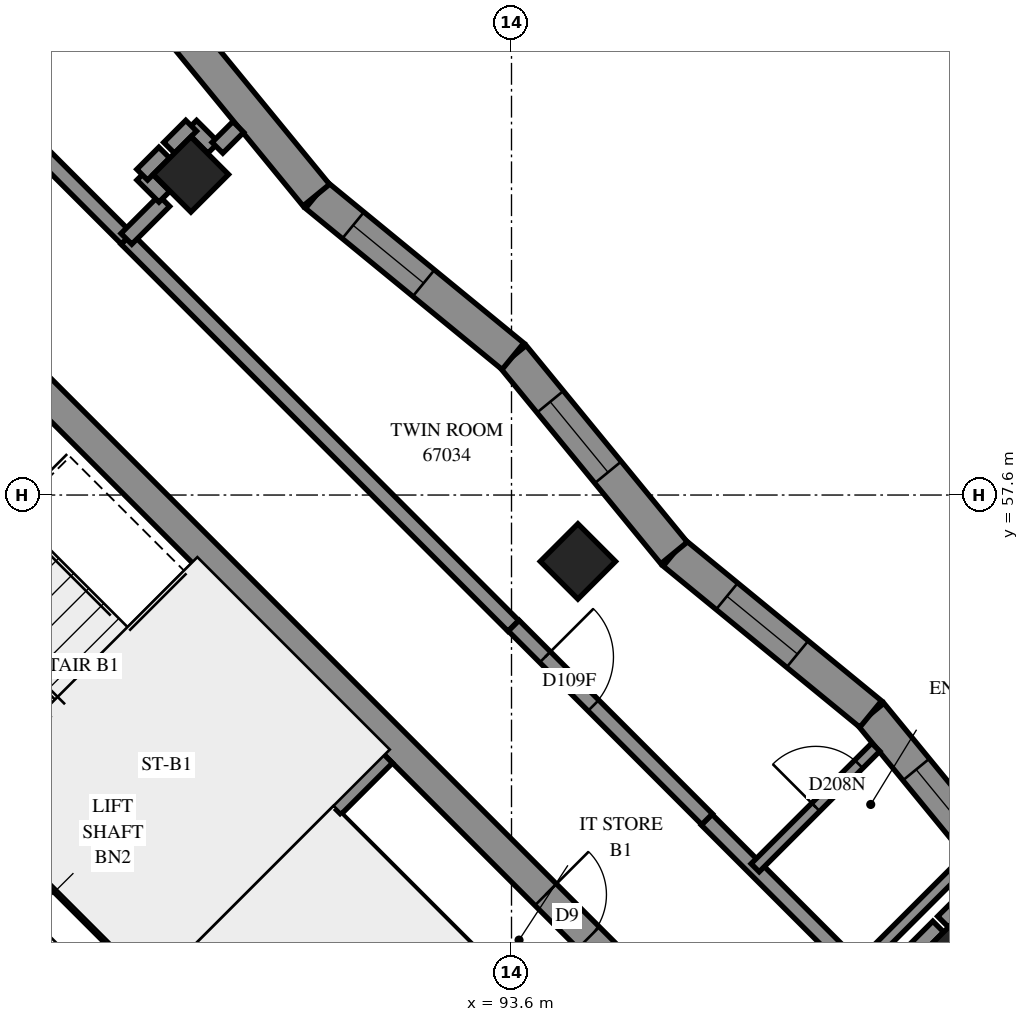
"""IFC4 building model, lengths in metres.
Left out: names, types, materials, properties, quantities, classifications, styles, units other than length and angle.
Written with IfcOpenShell. Run it as: python <this file> out.ifc"""

import sys

from ifc_helpers import new_model, si_unit, direction, frame, frame_2d, origin, origin_2d, place, context, subcontext, project, spatial, polyline, rectangle, outline, extrude, element, fill, save


model = new_model("IFC4")
c1 = context("Model", 3, precision=1e-05, world=origin(), true_north=direction((0.0, 1.0)))
c2 = subcontext(c1, "Body", "Model", "MODEL_VIEW")
j1 = project(units=[si_unit("LENGTHUNIT", "METRE"), si_unit("PLANEANGLEUNIT", "RADIAN")], contexts=[c1])
p1 = place(None, origin())
s1 = spatial("IfcSite", under=j1, at=p1, CompositionType="ELEMENT")
p2 = place(p1, origin())
s2 = spatial("IfcBuilding", under=s1, at=p2, CompositionType="ELEMENT")
p3 = place(p2, frame((0.0, 0.0, 247.2)))
s3 = spatial("IfcBuildingStorey", under=s2, at=p3, CompositionType="ELEMENT", Elevation=247.2)
for number, where, z_axis, x_axis in (
    (1, (89.382, 61.818, 0.0), (0.0, 0.0, 1.0), (0.707, -0.707, 0.0)),
    (2, (94.474, 56.727, 0.0), (0.0, 0.0, 1.0), (0.707, -0.707, 0.0)),
    (3, (99.565, 51.635, 0.0), (0.0, 0.0, 1.0), (0.707, -0.707, 0.0)),
):
    element("IfcColumn", number, at=place(p3, frame(where, z_axis=z_axis, x_axis=x_axis)), inside=s3, PredefinedType="COLUMN", context=c2, shape_type="SweptSolid", body=[
        extrude(rectangle(XDim=0.7, YDim=0.7, at=origin_2d()), origin(), (0.0, 0.0, 1.0), 3.1),
    ])
p4 = place(p3, frame((86.695, 59.696, -0.3), z_axis=(0.0, 0.0, 1.0), x_axis=(0.7071100706, -0.7071034917, 0.0)))
e4 = element("IfcWall", 4, at=p4, inside=s3, PredefinedType="SHEAR", context=c2, shape_type="SweptSolid", body=[
    extrude(rectangle(XDim=15.2, YDim=0.4, at=frame_2d((7.6, 0.0))), origin(), (0.0, 0.0, 1.0), 2.7),
])
p5 = place(p4, frame((10.4, 0.0, 0.3)))
e5 = element("IfcOpeningElement", 5, at=p5, cuts=e4, PredefinedType="OPENING", context=c2, shape_type="SweptSolid", body=[
    extrude(rectangle(XDim=0.8, YDim=2.1, at=frame_2d((0.4, 1.05))), frame((0.0, 0.21, 0.0), z_axis=(0.0, -1.0, 0.0), x_axis=(1.0, 0.0, 0.0)), (0.0, 0.0, 1.0), 0.42),
])
p6 = place(p3, frame((81.534, 53.969, 0.0), z_axis=(0.0, 0.0, 1.0), x_axis=(0.707103309, -0.7071102534, 0.0)))
e6 = element("IfcWall", 6, at=p6, inside=s3, PredefinedType="SOLIDWALL", context=c2, shape_type="SweptSolid", body=[
    extrude(rectangle(XDim=14.4, YDim=0.3, at=frame_2d((7.2, 0.0))), origin(), (0.0, 0.0, 1.0), 3.1),
])
p7 = place(p6, frame((8.55, 0.0, 0.0)))
e7 = element("IfcOpeningElement", 7, at=p7, cuts=e6, PredefinedType="OPENING", context=c2, shape_type="SweptSolid", body=[
    extrude(rectangle(XDim=0.9, YDim=2.1, at=frame_2d((0.45, 1.05))), frame((0.0, 0.16, 0.0), z_axis=(0.0, -1.0, 0.0), x_axis=(1.0, 0.0, 0.0)), (0.0, 0.0, 1.0), 0.32),
])
p8 = place(p6, frame((1.25, 0.0, 0.0)))
e8 = element("IfcOpeningElement", 8, at=p8, cuts=e6, PredefinedType="OPENING", context=c2, shape_type="SweptSolid", body=[
    extrude(rectangle(XDim=1.1, YDim=2.1, at=frame_2d((0.55, 1.05))), frame((0.0, 0.16, 0.0), z_axis=(0.0, -1.0, 0.0), x_axis=(1.0, 0.0, 0.0)), (0.0, 0.0, 1.0), 0.32),
])
p9 = place(p6, frame((4.85, 0.0, 0.0)))
e9 = element("IfcOpeningElement", 9, at=p9, cuts=e6, PredefinedType="OPENING", context=c2, shape_type="SweptSolid", body=[
    extrude(rectangle(XDim=1.1, YDim=2.1, at=frame_2d((0.55, 1.05))), frame((0.0, 0.16, 0.0), z_axis=(0.0, -1.0, 0.0), x_axis=(1.0, 0.0, 0.0)), (0.0, 0.0, 1.0), 0.32),
])
p10 = place(p6, frame((12.05, 0.0, 0.0)))
e10 = element("IfcOpeningElement", 10, at=p10, cuts=e6, PredefinedType="OPENING", context=c2, shape_type="SweptSolid", body=[
    extrude(rectangle(XDim=1.1, YDim=2.1, at=frame_2d((0.55, 1.05))), frame((0.0, 0.16, 0.0), z_axis=(0.0, -1.0, 0.0), x_axis=(1.0, 0.0, 0.0)), (0.0, 0.0, 1.0), 0.32),
])
p11 = place(p3, frame((83.867, 56.302, 0.0), z_axis=(0.0, 0.0, 1.0), x_axis=(0.7071137256, -0.7070998367, 0.0)))
e11 = element("IfcWall", 11, at=p11, inside=s3, PredefinedType="SOLIDWALL", context=c2, shape_type="SweptSolid", body=[
    extrude(rectangle(XDim=7.2, YDim=0.3, at=frame_2d((3.6, 0.0))), origin(), (0.0, 0.0, 1.0), 3.1),
])
p12 = place(p3, frame((88.958, 51.211, 0.0), z_axis=(0.0, 0.0, 1.0), x_axis=(0.7071067812, 0.7071067812, 0.0)))
e12 = element("IfcWall", 12, at=p12, inside=s3, PredefinedType="SOLIDWALL", context=c2, shape_type="SweptSolid", body=[
    extrude(rectangle(XDim=4.2, YDim=0.3, at=frame_2d((2.1, 0.0))), origin(), (0.0, 0.0, 1.0), 3.1),
])
p13 = place(p3, frame((100.458, 52.116, 0.0), z_axis=(0.0, 0.0, 1.0), x_axis=(-0.6339011425, 0.7734140815, 0.0)))
e13 = element("IfcWall", 13, at=p13, inside=s3, PredefinedType="SOLIDWALL", context=c2, shape_type="SweptSolid", body=[
    extrude(outline(polyline([(0.042, -0.225), (3.387, -0.225), (3.342, 0.225), (-0.042, 0.225), (0.042, -0.225)])), origin(), (0.0, 0.0, 1.0), 3.1),
])
p14 = place(p13, frame((1.221, 0.0, 0.45)))
e14 = element("IfcOpeningElement", 14, at=p14, cuts=e13, PredefinedType="OPENING", context=c2, shape_type="SweptSolid", body=[
    extrude(rectangle(XDim=1.2, YDim=2.55, at=frame_2d((0.6, 1.275))), frame((0.0, 0.235, 0.0), z_axis=(0.0, -1.0, 0.0), x_axis=(1.0, 0.0, 0.0)), (0.0, 0.0, 1.0), 0.47),
])
p15 = place(p3, frame((98.325, 54.719, 0.0), z_axis=(0.0, 0.0, 1.0), x_axis=(-0.7734281512, 0.6338839759, 0.0)))
e15 = element("IfcWall", 15, at=p15, inside=s3, PredefinedType="SOLIDWALL", context=c2, shape_type="SweptSolid", body=[
    extrude(outline(polyline([(-0.022, -0.225), (3.322, -0.225), (3.367, 0.225), (0.022, 0.225), (-0.022, -0.225)])), origin(), (0.0, 0.0, 1.0), 3.1),
])
p16 = place(p15, frame((1.245, 0.0, 0.45)))
e16 = element("IfcOpeningElement", 16, at=p16, cuts=e15, PredefinedType="OPENING", context=c2, shape_type="SweptSolid", body=[
    extrude(rectangle(XDim=1.2, YDim=2.55, at=frame_2d((0.6, 1.275))), frame((0.0, 0.235, 0.0), z_axis=(0.0, -1.0, 0.0), x_axis=(1.0, 0.0, 0.0)), (0.0, 0.0, 1.0), 0.47),
])
p17 = place(p3, frame((95.739, 56.839, 0.0), z_axis=(0.0, 0.0, 1.0), x_axis=(-0.6338872028, 0.7734255065, 0.0)))
e17 = element("IfcWall", 17, at=p17, inside=s3, PredefinedType="SOLIDWALL", context=c2, shape_type="SweptSolid", body=[
    extrude(outline(polyline([(0.022, -0.225), (3.367, -0.225), (3.322, 0.225), (-0.022, 0.225), (0.022, -0.225)])), origin(), (0.0, 0.0, 1.0), 3.1),
])
p18 = place(p17, frame((1.371, 0.0, 0.45)))
e18 = element("IfcOpeningElement", 18, at=p18, cuts=e17, PredefinedType="OPENING", context=c2, shape_type="SweptSolid", body=[
    extrude(rectangle(XDim=1.2, YDim=2.55, at=frame_2d((0.6, 1.275))), frame((0.0, 0.235, 0.0), z_axis=(0.0, -1.0, 0.0), x_axis=(1.0, 0.0, 0.0)), (0.0, 0.0, 1.0), 0.47),
])
p19 = place(p3, frame((93.619, 59.425, 0.0), z_axis=(0.0, 0.0, 1.0), x_axis=(-0.7734134923, 0.6339018614, 0.0)))
e19 = element("IfcWall", 19, at=p19, inside=s3, PredefinedType="SOLIDWALL", context=c2, shape_type="SweptSolid", body=[
    extrude(outline(polyline([(-0.022, -0.225), (3.322, -0.225), (3.367, 0.225), (0.022, 0.225), (-0.022, -0.225)])), origin(), (0.0, 0.0, 1.0), 3.1),
])
p20 = place(p19, frame((1.518, 0.0, 0.45)))
e20 = element("IfcOpeningElement", 20, at=p20, cuts=e19, PredefinedType="OPENING", context=c2, shape_type="SweptSolid", body=[
    extrude(rectangle(XDim=1.2, YDim=2.55, at=frame_2d((0.6, 1.275))), frame((0.0, 0.235, 0.0), z_axis=(0.0, -1.0, 0.0), x_axis=(1.0, 0.0, 0.0)), (0.0, 0.0, 1.0), 0.47),
])
p21 = place(p3, frame((91.032, 61.545, 0.0), z_axis=(0.0, 0.0, 1.0), x_axis=(-0.6339018614, 0.7734134923, 0.0)))
e21 = element("IfcWall", 21, at=p21, inside=s3, PredefinedType="SOLIDWALL", context=c2, shape_type="SweptSolid", body=[
    extrude(outline(polyline([(0.022, -0.225), (3.367, -0.225), (3.322, 0.225), (-0.022, 0.225), (0.022, -0.225)])), origin(), (0.0, 0.0, 1.0), 3.1),
])
p22 = place(p3, frame((91.313, 53.354, 0.0), z_axis=(0.0, 0.0, 1.0), x_axis=(0.7071067812, -0.7071067812, 0.0)))
e22 = element("IfcWall", 22, at=p22, inside=s3, PredefinedType="PARTITIONING", context=c2, shape_type="SweptSolid", body=[
    extrude(rectangle(XDim=5.65, YDim=0.15, at=frame_2d((2.825, 0.0))), origin(), (0.0, 0.0, 1.0), 3.1),
])
p23 = place(p3, frame((88.535, 60.971, 0.0), z_axis=(0.0, 0.0, 1.0), x_axis=(0.7069678741, -0.707245661, 0.0)))
e23 = element("IfcWall", 23, at=p23, inside=s3, PredefinedType="PARTITIONING", context=c2, shape_type="SweptSolid", body=[
    extrude(rectangle(XDim=7.2, YDim=0.2, at=frame_2d((3.6, 0.0))), origin(), (0.0, 0.0, 1.0), 3.1),
])
p24 = place(p3, frame((96.167, 53.329, 0.0), z_axis=(0.0, 0.0, 1.0), x_axis=(0.7071067812, -0.7071067812, 0.0)))
e24 = element("IfcWall", 24, at=p24, inside=s3, PredefinedType="PARTITIONING", context=c2, shape_type="SweptSolid", body=[
    extrude(rectangle(XDim=3.999, YDim=0.2, at=frame_2d((2.0, 0.0))), origin(), (0.0, 0.0, 1.0), 3.1),
])
p25 = place(p3, frame((93.629, 55.881, 0.0), z_axis=(0.0, 0.0, 1.0), x_axis=(0.7068288851, -0.7073845681, 0.0)))
e25 = element("IfcWall", 25, at=p25, inside=s3, PredefinedType="PARTITIONING", context=c2, shape_type="SweptSolid", body=[
    extrude(rectangle(XDim=3.599, YDim=0.2, at=frame_2d((1.8, 0.0))), origin(), (0.0, 0.0, 1.0), 3.1),
])
p26 = place(p25, frame((0.584, 0.0, 0.0)))
e26 = element("IfcOpeningElement", 26, at=p26, cuts=e25, PredefinedType="OPENING", context=c2, shape_type="SweptSolid", body=[
    extrude(rectangle(XDim=0.9, YDim=2.1, at=frame_2d((0.45, 1.05))), frame((0.0, 0.11, 0.0), z_axis=(0.0, -1.0, 0.0), x_axis=(1.0, 0.0, 0.0)), (0.0, 0.0, 1.0), 0.22),
])
p27 = place(p3, frame((86.841, 62.669, 0.0), z_axis=(0.0, 0.0, 1.0), x_axis=(0.7071067812, -0.7071067812, 0.0)))
e27 = element("IfcWall", 27, at=p27, inside=s3, PredefinedType="PARTITIONING", context=c2, shape_type="SweptSolid", body=[
    extrude(rectangle(XDim=2.398, YDim=0.2, at=frame_2d((1.199, 0.0))), origin(), (0.0, 0.0, 1.0), 3.1),
])
p28 = place(p3, frame((96.806, 52.696, 0.0), z_axis=(0.0, 0.0, 1.0), x_axis=(0.7070844922, 0.7071290695, 0.0)))
e28 = element("IfcWall", 28, at=p28, inside=s3, PredefinedType="PARTITIONING", context=c2, shape_type="SweptSolid", body=[
    extrude(rectangle(XDim=2.243, YDim=0.15, at=frame_2d((1.122, 0.0))), origin(), (0.0, 0.0, 1.0), 3.1),
])
p29 = place(p28, frame((1.128, 0.0, 0.0)))
e29 = element("IfcOpeningElement", 29, at=p29, cuts=e28, PredefinedType="OPENING", context=c2, shape_type="SweptSolid", body=[
    extrude(rectangle(XDim=0.8, YDim=2.1, at=frame_2d((0.4, 1.05))), frame((0.0, 0.085, 0.0), z_axis=(0.0, -1.0, 0.0), x_axis=(1.0, 0.0, 0.0)), (0.0, 0.0, 1.0), 0.17),
])
p30 = place(p3, frame((98.149, 51.353, 0.0), z_axis=(0.0, 0.0, 1.0), x_axis=(0.707082449, 0.7071311126, 0.0)))
e30 = element("IfcWall", 30, at=p30, inside=s3, PredefinedType="PARTITIONING", context=c2, shape_type="SweptSolid", body=[
    extrude(rectangle(XDim=2.055, YDim=0.15, at=frame_2d((1.027, 0.0))), origin(), (0.0, 0.0, 1.0), 3.1),
])
p31 = place(p3, frame((88.534, 60.971, 0.0), z_axis=(0.0, 0.0, 1.0), x_axis=(0.7071067812, 0.7071067812, 0.0)))
e31 = element("IfcWall", 31, at=p31, inside=s3, PredefinedType="PARTITIONING", context=c2, shape_type="SweptSolid", body=[
    extrude(rectangle(XDim=0.704, YDim=0.2, at=frame_2d((0.352, 0.0))), origin(), (0.0, 0.0, 1.0), 3.1),
])
for number, where, z_axis, x_axis in (
    (32, (88.743, 61.815, 0.0), (0.0, 0.0, 1.0), (0.707, -0.707, 0.0)),
    (33, (89.386, 62.458, 0.0), (0.0, 0.0, 1.0), (0.707, -0.707, 0.0)),
    (34, (88.741, 61.815, 0.0), (0.0, 0.0, 1.0), (0.707, 0.707, 0.0)),
    (35, (89.095, 62.169, 0.0), (0.0, 0.0, 1.0), (0.707, 0.707, 0.0)),
    (36, (99.278, 51.986, 0.0), (0.0, 0.0, 1.0), (0.707, 0.707, 0.0)),
    (37, (98.924, 51.632, 0.0), (0.0, 0.0, 1.0), (0.707, 0.707, 0.0)),
):
    element("IfcWall", number, at=place(p3, frame(where, z_axis=z_axis, x_axis=x_axis)), inside=s3, PredefinedType="PARTITIONING", context=c2, shape_type="SweptSolid", body=[
        extrude(rectangle(XDim=0.41, YDim=0.2, at=frame_2d((0.205, 0.0))), origin(), (0.0, 0.0, 1.0), 3.1),
    ])
p32 = place(p3, frame((89.731, 62.169, 0.0), z_axis=(0.0, 0.0, 1.0), x_axis=(0.7072357329, 0.7069778059, 0.0)))
e38 = element("IfcWall", 38, at=p32, inside=s3, PredefinedType="PARTITIONING", context=c2, shape_type="SweptSolid", body=[
    extrude(rectangle(XDim=0.388, YDim=0.2, at=frame_2d((0.194, 0.0))), origin(), (0.0, 0.0, 1.0), 3.1),
])
p33 = place(p14, origin())
e39 = element("IfcWindow", 39, at=p33, inside=s3, PartitioningType="SINGLE_PANEL", PredefinedType="WINDOW", context=c2, shape_type="SweptSolid", body=[
    extrude(rectangle(XDim=1.2, YDim=2.55, at=frame_2d((0.6, 1.275))), frame((0.0, 0.205, 0.0), z_axis=(0.0, -1.0, 0.0), x_axis=(1.0, 0.0, 0.0)), (0.0, 0.0, 1.0), 0.06),
])
fill(e14, e39)
p34 = place(p16, origin())
e40 = element("IfcWindow", 40, at=p34, inside=s3, PartitioningType="SINGLE_PANEL", PredefinedType="WINDOW", context=c2, shape_type="SweptSolid", body=[
    extrude(rectangle(XDim=1.2, YDim=2.55, at=frame_2d((0.6, 1.275))), frame((0.0, 0.205, 0.0), z_axis=(0.0, -1.0, 0.0), x_axis=(1.0, 0.0, 0.0)), (0.0, 0.0, 1.0), 0.06),
])
fill(e16, e40)
p35 = place(p18, origin())
e41 = element("IfcWindow", 41, at=p35, inside=s3, PartitioningType="SINGLE_PANEL", PredefinedType="WINDOW", context=c2, shape_type="SweptSolid", body=[
    extrude(rectangle(XDim=1.2, YDim=2.55, at=frame_2d((0.6, 1.275))), frame((0.0, 0.205, 0.0), z_axis=(0.0, -1.0, 0.0), x_axis=(1.0, 0.0, 0.0)), (0.0, 0.0, 1.0), 0.06),
])
fill(e18, e41)
p36 = place(p20, origin())
e42 = element("IfcWindow", 42, at=p36, inside=s3, PartitioningType="SINGLE_PANEL", PredefinedType="WINDOW", context=c2, shape_type="SweptSolid", body=[
    extrude(rectangle(XDim=1.2, YDim=2.55, at=frame_2d((0.6, 1.275))), frame((0.0, 0.205, 0.0), z_axis=(0.0, -1.0, 0.0), x_axis=(1.0, 0.0, 0.0)), (0.0, 0.0, 1.0), 0.06),
])
fill(e20, e42)
p37 = place(p5, origin())
e43 = element("IfcDoor", 43, at=p37, inside=s3, OperationType="SINGLE_SWING_RIGHT", PredefinedType="DOOR", context=c2, shape_type="SweptSolid", body=[
    extrude(rectangle(XDim=0.8, YDim=2.1, at=frame_2d((0.4, 1.05))), frame((0.0, 0.025, 0.0), z_axis=(0.0, -1.0, 0.0), x_axis=(1.0, 0.0, 0.0)), (0.0, 0.0, 1.0), 0.05),
])
fill(e5, e43)
p38 = place(p26, origin())
e44 = element("IfcDoor", 44, at=p38, inside=s3, OperationType="SINGLE_SWING_LEFT", PredefinedType="DOOR", context=c2, shape_type="SweptSolid", body=[
    extrude(rectangle(XDim=0.9, YDim=2.1, at=frame_2d((0.45, 1.05))), frame((0.0, 0.025, 0.0), z_axis=(0.0, -1.0, 0.0), x_axis=(1.0, 0.0, 0.0)), (0.0, 0.0, 1.0), 0.05),
])
fill(e26, e44)
p39 = place(p29, origin())
e45 = element("IfcDoor", 45, at=p39, inside=s3, OperationType="SINGLE_SWING_RIGHT", PredefinedType="DOOR", context=c2, shape_type="SweptSolid", body=[
    extrude(rectangle(XDim=0.8, YDim=2.1, at=frame_2d((0.4, 1.05))), frame((0.0, 0.025, 0.0), z_axis=(0.0, -1.0, 0.0), x_axis=(1.0, 0.0, 0.0)), (0.0, 0.0, 1.0), 0.05),
])
fill(e29, e45)
save(model, sys.argv[1])
